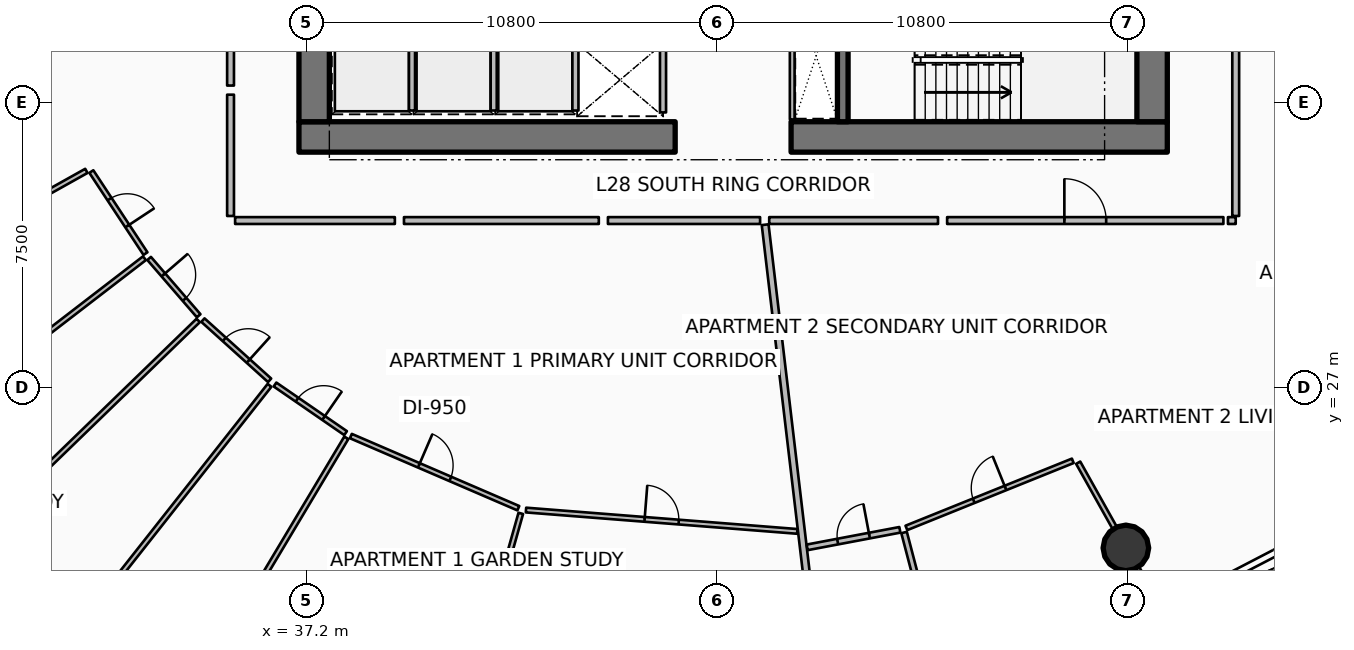
"""IFC4 building model, lengths in metres.
Left out: names, types, materials, properties, quantities, classifications, styles, units other than length and angle.
Written with IfcOpenShell. Run it as: python <this file> out.ifc"""

import sys

from ifc_helpers import new_model, si_unit, direction, frame, frame_2d, origin, origin_2d, place, context, subcontext, project, spatial, rectangle, circle, extrude, element, fill, save


model = new_model("IFC4")
c1 = context("Model", 3, precision=1e-05, world=origin(), true_north=direction((0.0, 1.0)))
c2 = subcontext(c1, "Body", "Model", "MODEL_VIEW")
j1 = project(units=[si_unit("LENGTHUNIT", "METRE"), si_unit("PLANEANGLEUNIT", "RADIAN")], contexts=[c1])
p1 = place(None, origin())
s1 = spatial("IfcSite", under=j1, at=p1, CompositionType="ELEMENT")
p2 = place(p1, origin())
s2 = spatial("IfcBuilding", under=s1, at=p2, CompositionType="ELEMENT")
p3 = place(p2, frame((0.0, 0.0, 112.65)))
s3 = spatial("IfcBuildingStorey", under=s2, at=p3, CompositionType="ELEMENT", Elevation=112.65)
p4 = place(p3, frame((37.0, 33.6, 0.0), z_axis=(0.0, 0.0, 1.0), x_axis=(1.0, 0.0, 0.0)))
e1 = element("IfcWall", 1, at=p4, inside=s3, PredefinedType="SHEAR", context=c2, shape_type="SweptSolid", body=[
    extrude(rectangle(XDim=9.9, YDim=0.8, at=frame_2d((4.95, 0.0))), origin(), (0.0, 0.0, 1.0), 3.75),
])
p5 = place(p3, frame((49.95, 33.6, 0.0), z_axis=(0.0, 0.0, 1.0), x_axis=(1.0, 0.0, 0.0)))
e2 = element("IfcWall", 2, at=p5, inside=s3, PredefinedType="SHEAR", context=c2, shape_type="SweptSolid", body=[
    extrude(rectangle(XDim=9.9, YDim=0.8, at=frame_2d((4.95, 0.0))), origin(), (0.0, 0.0, 1.0), 3.75),
])
for number, where, z_axis, x_axis in (
    (3, (37.4, 34.0, 0.0), (0.0, 0.0, 1.0), (0.0, 1.0, 0.0)),
    (4, (59.45, 34.0, 0.0), (0.0, 0.0, 1.0), (0.0, 1.0, 0.0)),
):
    element("IfcWall", number, at=place(p3, frame(where, z_axis=z_axis, x_axis=x_axis)), inside=s3, PredefinedType="SHEAR", context=c2, shape_type="SweptSolid", body=[
        extrude(rectangle(XDim=16.0, YDim=0.8, at=frame_2d((8.0, 0.0))), origin(), (0.0, 0.0, 1.0), 3.75),
    ])
p6 = place(p3, frame((51.31, 34.0, 0.0), z_axis=(0.0, 0.0, 1.0), x_axis=(0.0, 1.0, 0.0)))
e5 = element("IfcWall", 5, at=p6, inside=s3, PredefinedType="SHEAR", context=c2, shape_type="SweptSolid", body=[
    extrude(rectangle(XDim=3.5, YDim=0.28, at=frame_2d((1.75, 0.0))), origin(), (0.0, 0.0, 1.0), 3.75),
])
p7 = place(p3, frame((31.677, 21.294, 0.0), z_axis=(0.198457488994, 0.251703806559, 0.947237994818), x_axis=(-0.785271109582, 0.619152068926, 0.0)))
e6 = element("IfcColumn", 6, at=p7, inside=s3, PredefinedType="COLUMN", context=c2, shape_type="SweptSolid", body=[
    extrude(circle(Radius=0.6, at=origin_2d()), origin(), (0.0, 0.0, 1.0), 3.664),
])
p8 = place(p3, frame((58.76, 22.786, 0.0), z_axis=(-0.132897442347, 0.237292682336, 0.962304760836), x_axis=(-0.872484791249, -0.488641268252, 0.0)))
e7 = element("IfcColumn", 7, at=p8, inside=s3, PredefinedType="COLUMN", context=c2, shape_type="SweptSolid", body=[
    extrude(circle(Radius=0.6, at=origin_2d()), origin(), (0.0, 0.0, 1.0), 3.606),
])
for number, where, z_axis, x_axis in (
    (8, (39.975, 34.295, 0.0), (0.0, 0.0, 1.0), (0.0, 1.0, 0.0)),
    (9, (42.125, 34.295, 0.0), (0.0, 0.0, 1.0), (0.0, 1.0, 0.0)),
    (10, (44.275, 34.295, 0.0), (0.0, 0.0, 1.0), (0.0, 1.0, 0.0)),
):
    element("IfcWall", number, at=place(p3, frame(where, z_axis=z_axis, x_axis=x_axis)), inside=s3, PredefinedType="PARTITIONING", context=c2, shape_type="SweptSolid", body=[
        extrude(rectangle(XDim=1.61, YDim=0.16, at=frame_2d((0.805, 0.0))), origin(), (0.0, 0.0, 1.0), 3.47),
    ])
p9 = place(p3, frame((46.58, 34.245, 0.0), z_axis=(0.0, 0.0, 1.0), x_axis=(0.0, 1.0, 0.0)))
e11 = element("IfcWall", 11, at=p9, inside=s3, PredefinedType="PARTITIONING", context=c2, shape_type="SweptSolid", body=[
    extrude(rectangle(XDim=1.71, YDim=0.16, at=frame_2d((0.855, 0.0))), origin(), (0.0, 0.0, 1.0), 3.47),
])
p10 = place(p3, frame((49.98, 34.06, 0.0), z_axis=(0.0, 0.0, 1.0), x_axis=(0.0, 1.0, 0.0)))
e12 = element("IfcWall", 12, at=p10, inside=s3, PredefinedType="PARTITIONING", context=c2, shape_type="SweptSolid", body=[
    extrude(rectangle(XDim=3.4, YDim=0.125, at=frame_2d((1.7, 0.0))), origin(), (0.0, 0.0, 1.0), 2.91),
])
p11 = place(p3, frame((49.268, 31.291, 0.0), z_axis=(0.0, 0.0, 1.0), x_axis=(0.117532311618, -0.993069058891, 0.0)))
e13 = element("IfcWall", 13, at=p11, inside=s3, PredefinedType="PARTITIONING", context=c2, shape_type="SweptSolid", body=[
    extrude(rectangle(XDim=13.138, YDim=0.18, at=frame_2d((6.569, 0.0))), origin(), (0.0, 0.0, 1.0), 2.427),
])
p12 = place(p3, frame((35.2, 40.365, 0.0), z_axis=(0.0, 0.0, 1.0), x_axis=(0.0, -1.0, 0.0)))
e14 = element("IfcWall", 14, at=p12, inside=s3, PredefinedType="PARTITIONING", context=c2, shape_type="SweptSolid", body=[
    extrude(rectangle(XDim=5.413, YDim=0.18, at=frame_2d((2.707, 0.0))), origin(), (0.0, 0.0, 1.0), 2.427),
])
p13 = place(p12, frame((2.156, 0.0, 0.0)))
e15 = element("IfcOpeningElement", 15, at=p13, cuts=e14, PredefinedType="OPENING", context=c2, shape_type="SweptSolid", body=[
    extrude(rectangle(XDim=1.1, YDim=2.1, at=frame_2d((0.55, 1.05))), frame((0.0, 0.1, 0.0), z_axis=(0.0, -1.0, 0.0), x_axis=(1.0, 0.0, 0.0)), (0.0, 0.0, 1.0), 0.2),
])
p14 = place(p3, frame((35.2, 34.712, 0.0), z_axis=(0.0, 0.0, 1.0), x_axis=(0.0, -1.0, 0.0)))
e16 = element("IfcWall", 16, at=p14, inside=s3, PredefinedType="PARTITIONING", context=c2, shape_type="SweptSolid", body=[
    extrude(rectangle(XDim=3.192, YDim=0.18, at=frame_2d((1.596, 0.0))), origin(), (0.0, 0.0, 1.0), 2.427),
])
p15 = place(p3, frame((35.32, 31.4, 0.0), z_axis=(0.0, 0.0, 1.0), x_axis=(1.0, 0.0, 0.0)))
e17 = element("IfcWall", 17, at=p15, inside=s3, PredefinedType="PARTITIONING", context=c2, shape_type="SweptSolid", body=[
    extrude(rectangle(XDim=4.204, YDim=0.18, at=frame_2d((2.102, 0.0))), origin(), (0.0, 0.0, 1.0), 2.427),
])
p16 = place(p3, frame((31.406, 32.707, 0.0), z_axis=(0.0, 0.0, 1.0), x_axis=(-0.872500841978, -0.488612608052, 0.0)))
e18 = element("IfcWall", 18, at=p16, inside=s3, PredefinedType="PARTITIONING", context=c2, shape_type="SweptSolid", body=[
    extrude(rectangle(XDim=10.46, YDim=0.125, at=frame_2d((5.23, 0.0))), origin(), (0.0, 0.0, 1.0), 2.427),
])
p17 = place(p3, frame((32.934, 30.408, 0.0), z_axis=(0.0, 0.0, 1.0), x_axis=(-0.792552954037, -0.609803095308, 0.0)))
e19 = element("IfcWall", 19, at=p17, inside=s3, PredefinedType="PARTITIONING", context=c2, shape_type="SweptSolid", body=[
    extrude(rectangle(XDim=10.094, YDim=0.125, at=frame_2d((5.047, 0.0))), origin(), (0.0, 0.0, 1.0), 2.445),
])
p18 = place(p3, frame((34.349, 28.771, 0.0), z_axis=(0.0, 0.0, 1.0), x_axis=(-0.718111331478, -0.695928240268, 0.0)))
e20 = element("IfcWall", 20, at=p18, inside=s3, PredefinedType="PARTITIONING", context=c2, shape_type="SweptSolid", body=[
    extrude(rectangle(XDim=9.674, YDim=0.125, at=frame_2d((4.837, 0.0))), origin(), (0.0, 0.0, 1.0), 2.445),
])
p19 = place(p3, frame((31.537, 32.689, 0.0), z_axis=(0.0, 0.0, 1.0), x_axis=(0.550619938064, -0.834756062455, 0.0)))
e21 = element("IfcWall", 21, at=p19, inside=s3, PredefinedType="PARTITIONING", context=c2, shape_type="SweptSolid", body=[
    extrude(rectangle(XDim=2.586, YDim=0.125, at=frame_2d((1.293, 0.0))), origin(), (0.0, 0.0, 1.0), 2.427),
])
p20 = place(p19, frame((0.868, 0.0, 0.0)))
e22 = element("IfcOpeningElement", 22, at=p20, cuts=e21, PredefinedType="OPENING", context=c2, shape_type="SweptSolid", body=[
    extrude(rectangle(XDim=0.85, YDim=2.06, at=frame_2d((0.425, 1.03))), frame((0.0, 0.073, 0.0), z_axis=(0.0, -1.0, 0.0), x_axis=(1.0, 0.0, 0.0)), (0.0, 0.0, 1.0), 0.145),
])
p21 = place(p3, frame((33.058, 30.403, 0.0), z_axis=(0.0, 0.0, 1.0), x_axis=(0.653992855141, -0.756500724008, 0.0)))
e23 = element("IfcWall", 23, at=p21, inside=s3, PredefinedType="PARTITIONING", context=c2, shape_type="SweptSolid", body=[
    extrude(rectangle(XDim=1.993, YDim=0.125, at=frame_2d((0.997, 0.0))), origin(), (0.0, 0.0, 1.0), 2.91),
])
p22 = place(p21, frame((0.572, 0.0, 0.0)))
e24 = element("IfcOpeningElement", 24, at=p22, cuts=e23, PredefinedType="OPENING", context=c2, shape_type="SweptSolid", body=[
    extrude(rectangle(XDim=0.85, YDim=2.06, at=frame_2d((0.425, 1.03))), frame((0.0, 0.073, 0.0), z_axis=(0.0, -1.0, 0.0), x_axis=(1.0, 0.0, 0.0)), (0.0, 0.0, 1.0), 0.145),
])
p23 = place(p3, frame((34.473, 28.781, 0.0), z_axis=(0.0, 0.0, 1.0), x_axis=(0.742276601868, -0.670093610117, 0.0)))
e25 = element("IfcWall", 25, at=p23, inside=s3, PredefinedType="PARTITIONING", context=c2, shape_type="SweptSolid", body=[
    extrude(rectangle(XDim=2.364, YDim=0.125, at=frame_2d((1.182, 0.0))), origin(), (0.0, 0.0, 1.0), 2.427),
])
p24 = place(p23, frame((0.757, 0.0, 0.0)))
e26 = element("IfcOpeningElement", 26, at=p24, cuts=e25, PredefinedType="OPENING", context=c2, shape_type="SweptSolid", body=[
    extrude(rectangle(XDim=0.85, YDim=2.06, at=frame_2d((0.425, 1.03))), frame((0.0, 0.073, 0.0), z_axis=(0.0, -1.0, 0.0), x_axis=(1.0, 0.0, 0.0)), (0.0, 0.0, 1.0), 0.145),
])
p25 = place(p3, frame((39.764, 31.4, 0.0), z_axis=(0.0, 0.0, 1.0), x_axis=(1.0, 0.0, 0.0)))
e27 = element("IfcWall", 27, at=p25, inside=s3, PredefinedType="PARTITIONING", context=c2, shape_type="SweptSolid", body=[
    extrude(rectangle(XDim=5.127, YDim=0.18, at=frame_2d((2.563, 0.0))), origin(), (0.0, 0.0, 1.0), 2.427),
])
p26 = place(p3, frame((36.226, 27.064, 0.0), z_axis=(0.0, 0.0, 1.0), x_axis=(-0.619089743422, -0.785320246517, 0.0)))
e28 = element("IfcWall", 28, at=p26, inside=s3, PredefinedType="PARTITIONING", context=c2, shape_type="SweptSolid", body=[
    extrude(rectangle(XDim=9.652, YDim=0.125, at=frame_2d((4.826, 0.0))), origin(), (0.0, 0.0, 1.0), 2.427),
])
p27 = place(p3, frame((38.247, 25.684, 0.0), z_axis=(0.0, 0.0, 1.0), x_axis=(-0.51308300355, -0.858338995658, 0.0)))
e29 = element("IfcWall", 29, at=p27, inside=s3, PredefinedType="PARTITIONING", context=c2, shape_type="SweptSolid", body=[
    extrude(rectangle(XDim=8.238, YDim=0.125, at=frame_2d((4.119, 0.0))), origin(), (0.0, 0.0, 1.0), 2.445),
])
p28 = place(p3, frame((36.37, 27.086, 0.0), z_axis=(0.0, 0.0, 1.0), x_axis=(0.823491864383, -0.567328079065, 0.0)))
e30 = element("IfcWall", 30, at=p28, inside=s3, PredefinedType="PARTITIONING", context=c2, shape_type="SweptSolid", body=[
    extrude(rectangle(XDim=2.255, YDim=0.125, at=frame_2d((1.127, 0.0))), origin(), (0.0, 0.0, 1.0), 2.427),
])
p29 = place(p28, frame((0.702, 0.0, 0.0)))
e31 = element("IfcOpeningElement", 31, at=p29, cuts=e30, PredefinedType="OPENING", context=c2, shape_type="SweptSolid", body=[
    extrude(rectangle(XDim=0.85, YDim=2.06, at=frame_2d((0.425, 1.03))), frame((0.0, 0.073, 0.0), z_axis=(0.0, -1.0, 0.0), x_axis=(1.0, 0.0, 0.0)), (0.0, 0.0, 1.0), 0.145),
])
p30 = place(p3, frame((38.366, 25.729, 0.0), z_axis=(0.0, 0.0, 1.0), x_axis=(0.918374782562, -0.395711711673, 0.0)))
e32 = element("IfcWall", 32, at=p30, inside=s3, PredefinedType="PARTITIONING", context=c2, shape_type="SweptSolid", body=[
    extrude(rectangle(XDim=4.798, YDim=0.125, at=frame_2d((2.399, 0.0))), origin(), (0.0, 0.0, 1.0), 2.427),
])
p31 = place(p30, frame((1.949, 0.0, 0.0)))
e33 = element("IfcOpeningElement", 33, at=p31, cuts=e32, PredefinedType="OPENING", context=c2, shape_type="SweptSolid", body=[
    extrude(rectangle(XDim=0.9, YDim=2.08, at=frame_2d((0.45, 1.04))), frame((0.0, 0.073, 0.0), z_axis=(0.0, -1.0, 0.0), x_axis=(1.0, 0.0, 0.0)), (0.0, 0.0, 1.0), 0.145),
])
p32 = place(p3, frame((45.131, 31.4, 0.0), z_axis=(0.0, 0.0, 1.0), x_axis=(1.0, 0.0, 0.0)))
e34 = element("IfcWall", 34, at=p32, inside=s3, PredefinedType="PARTITIONING", context=c2, shape_type="SweptSolid", body=[
    extrude(rectangle(XDim=4.004, YDim=0.18, at=frame_2d((2.002, 0.0))), origin(), (0.0, 0.0, 1.0), 2.427),
])
p33 = place(p3, frame((42.837, 23.695, 0.0), z_axis=(0.0, 0.0, 1.0), x_axis=(-0.271444688389, -0.962454041056, 0.0)))
e35 = element("IfcWall", 35, at=p33, inside=s3, PredefinedType="PARTITIONING", context=c2, shape_type="SweptSolid", body=[
    extrude(rectangle(XDim=7.119, YDim=0.125, at=frame_2d((3.56, 0.0))), origin(), (0.0, 0.0, 1.0), 2.427),
])
p34 = place(p3, frame((42.974, 23.783, 0.0), z_axis=(0.0, 0.0, 1.0), x_axis=(0.996916140978, -0.078474249642, 0.0)))
e36 = element("IfcWall", 36, at=p34, inside=s3, PredefinedType="PARTITIONING", context=c2, shape_type="SweptSolid", body=[
    extrude(rectangle(XDim=7.162, YDim=0.125, at=frame_2d((3.581, 0.0))), origin(), (0.0, 0.0, 1.0), 2.427),
])
p35 = place(p34, frame((3.131, 0.0, 0.0)))
e37 = element("IfcOpeningElement", 37, at=p35, cuts=e36, PredefinedType="OPENING", context=c2, shape_type="SweptSolid", body=[
    extrude(rectangle(XDim=0.9, YDim=2.08, at=frame_2d((0.45, 1.04))), frame((0.0, 0.073, 0.0), z_axis=(0.0, -1.0, 0.0), x_axis=(1.0, 0.0, 0.0)), (0.0, 0.0, 1.0), 0.145),
])
p36 = place(p3, frame((54.056, 31.4, 0.0), z_axis=(0.0, 0.0, 1.0), x_axis=(1.0, 0.0, 0.0)))
e38 = element("IfcWall", 38, at=p36, inside=s3, PredefinedType="PARTITIONING", context=c2, shape_type="SweptSolid", body=[
    extrude(rectangle(XDim=7.27, YDim=0.18, at=frame_2d((3.635, 0.0))), origin(), (0.0, 0.0, 1.0), 2.427),
])
p37 = place(p36, frame((3.085, 0.0, 0.0)))
e39 = element("IfcOpeningElement", 39, at=p37, cuts=e38, PredefinedType="OPENING", context=c2, shape_type="SweptSolid", body=[
    extrude(rectangle(XDim=1.1, YDim=2.1, at=frame_2d((0.55, 1.05))), frame((0.0, 0.1, 0.0), z_axis=(0.0, -1.0, 0.0), x_axis=(1.0, 0.0, 0.0)), (0.0, 0.0, 1.0), 0.2),
])
p38 = place(p3, frame((49.375, 31.4, 0.0), z_axis=(0.0, 0.0, 1.0), x_axis=(1.0, 0.0, 0.0)))
e40 = element("IfcWall", 40, at=p38, inside=s3, PredefinedType="PARTITIONING", context=c2, shape_type="SweptSolid", body=[
    extrude(rectangle(XDim=4.442, YDim=0.18, at=frame_2d((2.221, 0.0))), origin(), (0.0, 0.0, 1.0), 2.427),
])
p39 = place(p3, frame((57.505, 25.028, 0.0), z_axis=(0.0, 0.0, 1.0), x_axis=(0.488618677979, -0.872497442707, 0.0)))
e41 = element("IfcWall", 41, at=p39, inside=s3, PredefinedType="PARTITIONING", context=c2, shape_type="SweptSolid", body=[
    extrude(rectangle(XDim=4.37, YDim=0.125, at=frame_2d((2.185, 0.0))), origin(), (0.0, 0.0, 1.0), 2.427),
])
p40 = place(p3, frame((50.373, 22.801, 0.0), z_axis=(0.0, 0.0, 1.0), x_axis=(0.982580437485, 0.185837789137, 0.0)))
e42 = element("IfcWall", 42, at=p40, inside=s3, PredefinedType="PARTITIONING", context=c2, shape_type="SweptSolid", body=[
    extrude(rectangle(XDim=2.483, YDim=0.15, at=frame_2d((1.241, 0.0))), origin(), (0.0, 0.0, 1.0), 2.427),
])
p41 = place(p40, frame((0.816, 0.0, 0.0)))
e43 = element("IfcOpeningElement", 43, at=p41, cuts=e42, PredefinedType="OPENING", context=c2, shape_type="SweptSolid", body=[
    extrude(rectangle(XDim=0.85, YDim=2.06, at=frame_2d((0.425, 1.03))), frame((0.0, 0.085, 0.0), z_axis=(0.0, -1.0, 0.0), x_axis=(1.0, 0.0, 0.0)), (0.0, 0.0, 1.0), 0.17),
])
p42 = place(p3, frame((52.924, 23.192, 0.0), z_axis=(0.0, 0.0, 1.0), x_axis=(0.253254995503, -0.967399559258, 0.0)))
e44 = element("IfcWall", 44, at=p42, inside=s3, PredefinedType="PARTITIONING", context=c2, shape_type="SweptSolid", body=[
    extrude(rectangle(XDim=3.96, YDim=0.15, at=frame_2d((1.98, 0.0))), origin(), (0.0, 0.0, 1.0), 2.445),
])
p43 = place(p3, frame((52.984, 23.312, 0.0), z_axis=(0.0, 0.0, 1.0), x_axis=(0.927438868519, 0.373974792145, 0.0)))
e45 = element("IfcWall", 45, at=p43, inside=s3, PredefinedType="PARTITIONING", context=c2, shape_type="SweptSolid", body=[
    extrude(rectangle(XDim=4.721, YDim=0.125, at=frame_2d((2.361, 0.0))), origin(), (0.0, 0.0, 1.0), 2.427),
])
p44 = place(p43, frame((1.911, 0.0, 0.0)))
e46 = element("IfcOpeningElement", 46, at=p44, cuts=e45, PredefinedType="OPENING", context=c2, shape_type="SweptSolid", body=[
    extrude(rectangle(XDim=0.9, YDim=2.08, at=frame_2d((0.45, 1.04))), frame((0.0, 0.073, 0.0), z_axis=(0.0, -1.0, 0.0), x_axis=(1.0, 0.0, 0.0)), (0.0, 0.0, 1.0), 0.145),
])
p45 = place(p3, frame((61.446, 31.4, 0.0), z_axis=(0.0, 0.0, 1.0), x_axis=(1.0, 0.0, 0.0)))
e47 = element("IfcWall", 47, at=p45, inside=s3, PredefinedType="PARTITIONING", context=c2, shape_type="SweptSolid", body=[
    extrude(rectangle(XDim=0.204, YDim=0.18, at=frame_2d((0.102, 0.0))), origin(), (0.0, 0.0, 1.0), 2.427),
])
p46 = place(p3, frame((61.65, 31.52, 0.0), z_axis=(0.0, 0.0, 1.0), x_axis=(0.0, 1.0, 0.0)))
e48 = element("IfcWall", 48, at=p46, inside=s3, PredefinedType="PARTITIONING", context=c2, shape_type="SweptSolid", body=[
    extrude(rectangle(XDim=6.51, YDim=0.18, at=frame_2d((3.255, 0.0))), origin(), (0.0, 0.0, 1.0), 2.427),
])
p47 = place(p20, origin())
e49 = element("IfcDoor", 49, at=p47, inside=s3, OperationType="SINGLE_SWING_RIGHT", PredefinedType="DOOR", context=c2, shape_type="SweptSolid", body=[
    extrude(rectangle(XDim=0.85, YDim=2.06, at=frame_2d((0.425, 1.03))), frame((0.0, 0.025, 0.0), z_axis=(0.0, -1.0, 0.0), x_axis=(1.0, 0.0, 0.0)), (0.0, 0.0, 1.0), 0.05),
])
fill(e22, e49)
p48 = place(p22, origin())
e50 = element("IfcDoor", 50, at=p48, inside=s3, OperationType="SINGLE_SWING_LEFT", PredefinedType="DOOR", context=c2, shape_type="SweptSolid", body=[
    extrude(rectangle(XDim=0.85, YDim=2.06, at=frame_2d((0.425, 1.03))), frame((0.0, 0.025, 0.0), z_axis=(0.0, -1.0, 0.0), x_axis=(1.0, 0.0, 0.0)), (0.0, 0.0, 1.0), 0.05),
])
fill(e24, e50)
p49 = place(p24, origin())
e51 = element("IfcDoor", 51, at=p49, inside=s3, OperationType="SINGLE_SWING_RIGHT", PredefinedType="DOOR", context=c2, shape_type="SweptSolid", body=[
    extrude(rectangle(XDim=0.85, YDim=2.06, at=frame_2d((0.425, 1.03))), frame((0.0, 0.025, 0.0), z_axis=(0.0, -1.0, 0.0), x_axis=(1.0, 0.0, 0.0)), (0.0, 0.0, 1.0), 0.05),
])
fill(e26, e51)
p50 = place(p29, origin())
e52 = element("IfcDoor", 52, at=p50, inside=s3, OperationType="SINGLE_SWING_RIGHT", PredefinedType="DOOR", context=c2, shape_type="SweptSolid", body=[
    extrude(rectangle(XDim=0.85, YDim=2.06, at=frame_2d((0.425, 1.03))), frame((0.0, 0.025, 0.0), z_axis=(0.0, -1.0, 0.0), x_axis=(1.0, 0.0, 0.0)), (0.0, 0.0, 1.0), 0.05),
])
fill(e31, e52)
p51 = place(p31, origin())
e53 = element("IfcDoor", 53, at=p51, inside=s3, OperationType="SINGLE_SWING_LEFT", PredefinedType="DOOR", context=c2, shape_type="SweptSolid", body=[
    extrude(rectangle(XDim=0.9, YDim=2.08, at=frame_2d((0.45, 1.04))), frame((0.0, 0.025, 0.0), z_axis=(0.0, -1.0, 0.0), x_axis=(1.0, 0.0, 0.0)), (0.0, 0.0, 1.0), 0.05),
])
fill(e33, e53)
p52 = place(p35, origin())
e54 = element("IfcDoor", 54, at=p52, inside=s3, OperationType="SINGLE_SWING_LEFT", PredefinedType="DOOR", context=c2, shape_type="SweptSolid", body=[
    extrude(rectangle(XDim=0.9, YDim=2.08, at=frame_2d((0.45, 1.04))), frame((0.0, 0.025, 0.0), z_axis=(0.0, -1.0, 0.0), x_axis=(1.0, 0.0, 0.0)), (0.0, 0.0, 1.0), 0.05),
])
fill(e37, e54)
p53 = place(p37, origin())
e55 = element("IfcDoor", 55, at=p53, inside=s3, OperationType="SINGLE_SWING_LEFT", PredefinedType="DOOR", context=c2, shape_type="SweptSolid", body=[
    extrude(rectangle(XDim=1.1, YDim=2.1, at=frame_2d((0.55, 1.05))), frame((0.0, 0.025, 0.0), z_axis=(0.0, -1.0, 0.0), x_axis=(1.0, 0.0, 0.0)), (0.0, 0.0, 1.0), 0.05),
])
fill(e39, e55)
p54 = place(p41, origin())
e56 = element("IfcDoor", 56, at=p54, inside=s3, OperationType="SINGLE_SWING_RIGHT", PredefinedType="DOOR", context=c2, shape_type="SweptSolid", body=[
    extrude(rectangle(XDim=0.85, YDim=2.06, at=frame_2d((0.425, 1.03))), frame((0.0, 0.025, 0.0), z_axis=(0.0, -1.0, 0.0), x_axis=(1.0, 0.0, 0.0)), (0.0, 0.0, 1.0), 0.05),
])
fill(e43, e56)
p55 = place(p44, origin())
e57 = element("IfcDoor", 57, at=p55, inside=s3, OperationType="SINGLE_SWING_RIGHT", PredefinedType="DOOR", context=c2, shape_type="SweptSolid", body=[
    extrude(rectangle(XDim=0.9, YDim=2.08, at=frame_2d((0.45, 1.04))), frame((0.0, 0.025, 0.0), z_axis=(0.0, -1.0, 0.0), x_axis=(1.0, 0.0, 0.0)), (0.0, 0.0, 1.0), 0.05),
])
fill(e46, e57)
save(model, sys.argv[1])
